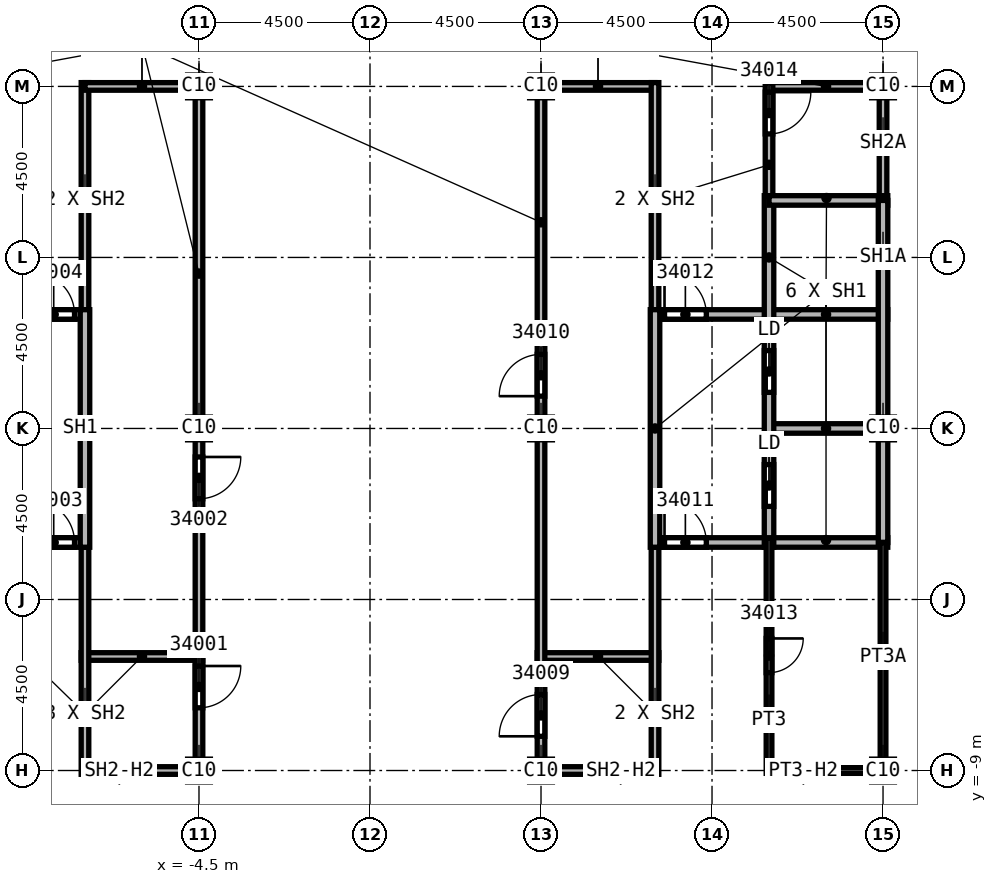
"""IFC4 building model, lengths in metres.
Left out: names, types, materials, properties, quantities, classifications, styles, units other than length and angle.
Written with IfcOpenShell. Run it as: python <this file> out.ifc"""

import sys

from ifc_helpers import new_model, si_unit, direction, frame, frame_2d, origin, origin_2d, place, context, subcontext, project, spatial, rectangle, extrude, element, fill, save


model = new_model("IFC4")
c1 = context("Model", 3, precision=1e-05, world=origin(), true_north=direction((0.0, 1.0)))
c2 = subcontext(c1, "Body", "Model", "MODEL_VIEW")
j1 = project(units=[si_unit("LENGTHUNIT", "METRE"), si_unit("PLANEANGLEUNIT", "RADIAN")], contexts=[c1])
p1 = place(None, origin())
s1 = spatial("IfcSite", under=j1, at=p1, CompositionType="ELEMENT")
p2 = place(p1, origin())
s2 = spatial("IfcBuilding", under=s1, at=p2, CompositionType="ELEMENT")
p3 = place(p2, frame((0.0, 0.0, 366.0)))
s3 = spatial("IfcBuildingStorey", under=s2, at=p3, CompositionType="ELEMENT", Elevation=366.0)
for number, where, z_axis, x_axis in (
    (1, (4.5, 0.0, 0.0), (0.0, 0.0, 1.0), (1.0, 0.0, 0.0)),
    (2, (4.5, 9.0, 0.0), (0.0, 0.0, 1.0), (1.0, 0.0, 0.0)),
    (3, (4.5, -9.0, 0.0), (0.0, 0.0, 1.0), (1.0, 0.0, 0.0)),
    (4, (13.5, 0.0, 0.0), (0.0, 0.0, 1.0), (1.0, 0.0, 0.0)),
    (5, (13.5, 9.0, 0.0), (0.0, 0.0, 1.0), (1.0, 0.0, 0.0)),
    (6, (13.5, -9.0, 0.0), (0.0, 0.0, 1.0), (1.0, 0.0, 0.0)),
    (7, (-4.5, 0.0, 0.0), (0.0, 0.0, 1.0), (1.0, 0.0, 0.0)),
    (8, (-4.5, 9.0, 0.0), (0.0, 0.0, 1.0), (1.0, 0.0, 0.0)),
    (9, (-4.5, -9.0, 0.0), (0.0, 0.0, 1.0), (1.0, 0.0, 0.0)),
):
    element("IfcColumn", number, at=place(p3, frame(where, z_axis=z_axis, x_axis=x_axis)), inside=s3, PredefinedType="COLUMN", context=c2, shape_type="SweptSolid", body=[
        extrude(rectangle(XDim=0.6, YDim=0.6, at=origin_2d()), origin(), (0.0, 0.0, 1.0), 9.6),
    ])
p4 = place(p3, frame((-7.6, -6.0, 0.0), z_axis=(0.0, 0.0, 1.0), x_axis=(1.0, 0.0, 0.0)))
e10 = element("IfcWall", 10, at=p4, inside=s3, PredefinedType="SOLIDWALL", context=c2, shape_type="SweptSolid", body=[
    extrude(rectangle(XDim=3.2, YDim=0.2, at=frame_2d((1.6, 0.0))), origin(), (0.0, 0.0, 1.0), 9.15),
])
for number, where, z_axis, x_axis in (
    (11, (-7.5, -9.1, 0.0), (0.0, 0.0, 1.0), (0.0, 1.0, 0.0)),
    (12, (-7.5, 2.875, 0.0), (0.0, 0.0, 1.0), (0.0, 1.0, 0.0)),
):
    element("IfcWall", number, at=place(p3, frame(where, z_axis=z_axis, x_axis=x_axis)), inside=s3, PredefinedType="SOLIDWALL", context=c2, shape_type="SweptSolid", body=[
        extrude(rectangle(XDim=6.225, YDim=0.2, at=frame_2d((3.113, 0.0))), origin(), (0.0, 0.0, 1.0), 9.15),
    ])
p5 = place(p3, frame((-7.5, 9.0, 0.0), z_axis=(0.0, 0.0, 1.0), x_axis=(1.0, 0.0, 0.0)))
e13 = element("IfcWall", 13, at=p5, inside=s3, PredefinedType="SOLIDWALL", context=c2, shape_type="SweptSolid", body=[
    extrude(rectangle(XDim=3.0, YDim=0.2, at=frame_2d((1.5, 0.0))), origin(), (0.0, 0.0, 1.0), 8.838),
])
p6 = place(p3, frame((-4.5, -9.0, 0.0), z_axis=(0.0, 0.0, 1.0), x_axis=(-1.0, 0.0, 0.0)))
e14 = element("IfcWall", 14, at=p6, inside=s3, PredefinedType="SOLIDWALL", context=c2, shape_type="SweptSolid", body=[
    extrude(rectangle(XDim=3.0, YDim=0.2, at=frame_2d((1.5, 0.0))), origin(), (0.0, 0.0, 1.0), 8.754),
])
p7 = place(p3, frame((-4.5, 9.1, 0.0), z_axis=(0.0, 0.0, 1.0), x_axis=(0.0, -1.0, 0.0)))
e15 = element("IfcWall", 15, at=p7, inside=s3, PredefinedType="SOLIDWALL", context=c2, shape_type="SweptSolid", body=[
    extrude(rectangle(XDim=18.2, YDim=0.2, at=frame_2d((9.1, 0.0))), origin(), (0.0, 0.0, 1.0), 8.838),
])
p8 = place(p7, frame((15.35, 0.0, 0.0)))
e16 = element("IfcOpeningElement", 16, at=p8, cuts=e15, PredefinedType="OPENING", context=c2, shape_type="SweptSolid", body=[
    extrude(rectangle(XDim=1.1, YDim=2.1, at=frame_2d((0.55, 1.05))), frame((0.0, 0.1, 0.0), z_axis=(0.0, -1.0, 0.0), x_axis=(1.0, 0.0, 0.0)), (0.0, 0.0, 1.0), 0.2),
])
p9 = place(p7, frame((9.85, 0.0, 0.0)))
e17 = element("IfcOpeningElement", 17, at=p9, cuts=e15, PredefinedType="OPENING", context=c2, shape_type="SweptSolid", body=[
    extrude(rectangle(XDim=1.1, YDim=2.1, at=frame_2d((0.55, 1.05))), frame((0.0, 0.1, 0.0), z_axis=(0.0, -1.0, 0.0), x_axis=(1.0, 0.0, 0.0)), (0.0, 0.0, 1.0), 0.2),
])
p10 = place(p3, frame((4.4, -6.0, 0.0), z_axis=(0.0, 0.0, 1.0), x_axis=(1.0, 0.0, 0.0)))
e18 = element("IfcWall", 18, at=p10, inside=s3, PredefinedType="SOLIDWALL", context=c2, shape_type="SweptSolid", body=[
    extrude(rectangle(XDim=3.2, YDim=0.2, at=frame_2d((1.6, 0.0))), origin(), (0.0, 0.0, 1.0), 9.15),
])
p11 = place(p3, frame((4.5, -9.1, 0.0), z_axis=(0.0, 0.0, 1.0), x_axis=(0.0, 1.0, 0.0)))
e19 = element("IfcWall", 19, at=p11, inside=s3, PredefinedType="SOLIDWALL", context=c2, shape_type="SweptSolid", body=[
    extrude(rectangle(XDim=18.2, YDim=0.2, at=frame_2d((9.1, 0.0))), origin(), (0.0, 0.0, 1.0), 8.838),
])
p12 = place(p11, frame((1.0, 0.0, 0.0)))
e20 = element("IfcOpeningElement", 20, at=p12, cuts=e19, PredefinedType="OPENING", context=c2, shape_type="SweptSolid", body=[
    extrude(rectangle(XDim=1.1, YDim=2.1, at=frame_2d((0.55, 1.05))), frame((0.0, 0.1, 0.0), z_axis=(0.0, -1.0, 0.0), x_axis=(1.0, 0.0, 0.0)), (0.0, 0.0, 1.0), 0.2),
])
p13 = place(p11, frame((9.95, 0.0, 0.0)))
e21 = element("IfcOpeningElement", 21, at=p13, cuts=e19, PredefinedType="OPENING", context=c2, shape_type="SweptSolid", body=[
    extrude(rectangle(XDim=1.1, YDim=2.1, at=frame_2d((0.55, 1.05))), frame((0.0, 0.1, 0.0), z_axis=(0.0, -1.0, 0.0), x_axis=(1.0, 0.0, 0.0)), (0.0, 0.0, 1.0), 0.2),
])
p14 = place(p3, frame((4.5, 9.0, 0.0), z_axis=(0.0, 0.0, 1.0), x_axis=(1.0, 0.0, 0.0)))
e22 = element("IfcWall", 22, at=p14, inside=s3, PredefinedType="SOLIDWALL", context=c2, shape_type="SweptSolid", body=[
    extrude(rectangle(XDim=3.0, YDim=0.2, at=frame_2d((1.5, 0.0))), origin(), (0.0, 0.0, 1.0), 8.838),
])
p15 = place(p3, frame((7.5, -9.0, 0.0), z_axis=(0.0, 0.0, 1.0), x_axis=(-1.0, 0.0, 0.0)))
e23 = element("IfcWall", 23, at=p15, inside=s3, PredefinedType="SOLIDWALL", context=c2, shape_type="SweptSolid", body=[
    extrude(rectangle(XDim=3.0, YDim=0.2, at=frame_2d((1.5, 0.0))), origin(), (0.0, 0.0, 1.0), 8.754),
])
for number, where, z_axis, x_axis in (
    (24, (7.5, -2.875, 0.0), (0.0, 0.0, 1.0), (0.0, -1.0, 0.0)),
    (25, (7.5, 9.1, 0.0), (0.0, 0.0, 1.0), (0.0, -1.0, 0.0)),
):
    element("IfcWall", number, at=place(p3, frame(where, z_axis=z_axis, x_axis=x_axis)), inside=s3, PredefinedType="SOLIDWALL", context=c2, shape_type="SweptSolid", body=[
        extrude(rectangle(XDim=6.225, YDim=0.2, at=frame_2d((3.113, 0.0))), origin(), (0.0, 0.0, 1.0), 9.15),
    ])
p16 = place(p3, frame((10.5, 9.0, 0.0), z_axis=(0.0, 0.0, 1.0), x_axis=(1.0, 0.0, 0.0)))
e26 = element("IfcWall", 26, at=p16, inside=s3, PredefinedType="SOLIDWALL", context=c2, shape_type="SweptSolid", body=[
    extrude(rectangle(XDim=3.0, YDim=0.2, at=frame_2d((1.5, 0.0))), origin(), (0.0, 0.0, 1.0), 8.838),
])
p17 = place(p3, frame((10.5, 9.1, 0.0), z_axis=(0.0, 0.0, 1.0), x_axis=(0.0, -1.0, 0.0)))
e27 = element("IfcWall", 27, at=p17, inside=s3, PredefinedType="SOLIDWALL", context=c2, shape_type="SweptSolid", body=[
    extrude(rectangle(XDim=3.225, YDim=0.2, at=frame_2d((1.613, 0.0))), origin(), (0.0, 0.0, 1.0), 9.15),
])
p18 = place(p17, frame((0.25, 0.0, 0.0)))
e28 = element("IfcOpeningElement", 28, at=p18, cuts=e27, PredefinedType="OPENING", context=c2, shape_type="SweptSolid", body=[
    extrude(rectangle(XDim=1.1, YDim=2.1, at=frame_2d((0.55, 1.05))), frame((0.0, 0.1, 0.0), z_axis=(0.0, -1.0, 0.0), x_axis=(1.0, 0.0, 0.0)), (0.0, 0.0, 1.0), 0.2),
])
p19 = place(p3, frame((13.5, 9.1, 0.0), z_axis=(0.0, 0.0, 1.0), x_axis=(0.0, -1.0, 0.0)))
e29 = element("IfcWall", 29, at=p19, inside=s3, PredefinedType="SOLIDWALL", context=c2, shape_type="SweptSolid", body=[
    extrude(rectangle(XDim=3.1, YDim=0.2, at=frame_2d((1.55, 0.0))), origin(), (0.0, 0.0, 1.0), 5.76),
])
p20 = place(p3, frame((-13.625, 3.0, 0.0), z_axis=(0.0, 0.0, 1.0), x_axis=(1.0, 0.0, 0.0)))
e30 = element("IfcWall", 30, at=p20, inside=s3, PredefinedType="SOLIDWALL", context=c2, shape_type="SweptSolid", body=[
    extrude(rectangle(XDim=6.125, YDim=0.25, at=frame_2d((3.062, 0.0))), origin(), (0.0, 0.0, 1.0), 9.15),
])
p21 = place(p20, frame((4.75, 0.0, 0.0)))
e31 = element("IfcOpeningElement", 31, at=p21, cuts=e30, PredefinedType="OPENING", context=c2, shape_type="SweptSolid", body=[
    extrude(rectangle(XDim=1.1, YDim=2.1, at=frame_2d((0.55, 1.05))), frame((0.0, 0.125, 0.0), z_axis=(0.0, -1.0, 0.0), x_axis=(1.0, 0.0, 0.0)), (0.0, 0.0, 1.0), 0.25),
])
p22 = place(p3, frame((-13.625, -3.0, 0.0), z_axis=(0.0, 0.0, 1.0), x_axis=(1.0, 0.0, 0.0)))
e32 = element("IfcWall", 32, at=p22, inside=s3, PredefinedType="SOLIDWALL", context=c2, shape_type="SweptSolid", body=[
    extrude(rectangle(XDim=6.125, YDim=0.25, at=frame_2d((3.062, 0.0))), origin(), (0.0, 0.0, 1.0), 9.15),
])
p23 = place(p22, frame((4.75, 0.0, 0.0)))
e33 = element("IfcOpeningElement", 33, at=p23, cuts=e32, PredefinedType="OPENING", context=c2, shape_type="SweptSolid", body=[
    extrude(rectangle(XDim=1.1, YDim=2.1, at=frame_2d((0.55, 1.05))), frame((0.0, 0.125, 0.0), z_axis=(0.0, -1.0, 0.0), x_axis=(1.0, 0.0, 0.0)), (0.0, 0.0, 1.0), 0.25),
])
p24 = place(p3, frame((-7.5, -3.125, 0.0), z_axis=(0.0, 0.0, 1.0), x_axis=(0.0, 1.0, 0.0)))
e34 = element("IfcWall", 34, at=p24, inside=s3, PredefinedType="SOLIDWALL", context=c2, shape_type="SweptSolid", body=[
    extrude(rectangle(XDim=6.25, YDim=0.25, at=frame_2d((3.125, 0.0))), origin(), (0.0, 0.0, 1.0), 9.15),
])
p25 = place(p3, frame((7.5, -3.0, 0.0), z_axis=(0.0, 0.0, 1.0), x_axis=(1.0, 0.0, 0.0)))
e35 = element("IfcWall", 35, at=p25, inside=s3, PredefinedType="SOLIDWALL", context=c2, shape_type="SweptSolid", body=[
    extrude(rectangle(XDim=6.125, YDim=0.25, at=frame_2d((3.062, 0.0))), origin(), (0.0, 0.0, 1.0), 9.15),
])
p26 = place(p25, frame((0.25, 0.0, 0.0)))
e36 = element("IfcOpeningElement", 36, at=p26, cuts=e35, PredefinedType="OPENING", context=c2, shape_type="SweptSolid", body=[
    extrude(rectangle(XDim=1.1, YDim=2.1, at=frame_2d((0.55, 1.05))), frame((0.0, 0.125, 0.0), z_axis=(0.0, -1.0, 0.0), x_axis=(1.0, 0.0, 0.0)), (0.0, 0.0, 1.0), 0.25),
])
p27 = place(p3, frame((7.5, 3.0, 0.0), z_axis=(0.0, 0.0, 1.0), x_axis=(1.0, 0.0, 0.0)))
e37 = element("IfcWall", 37, at=p27, inside=s3, PredefinedType="SOLIDWALL", context=c2, shape_type="SweptSolid", body=[
    extrude(rectangle(XDim=6.125, YDim=0.25, at=frame_2d((3.062, 0.0))), origin(), (0.0, 0.0, 1.0), 9.15),
])
p28 = place(p27, frame((0.25, 0.0, 0.0)))
e38 = element("IfcOpeningElement", 38, at=p28, cuts=e37, PredefinedType="OPENING", context=c2, shape_type="SweptSolid", body=[
    extrude(rectangle(XDim=1.1, YDim=2.1, at=frame_2d((0.55, 1.05))), frame((0.0, 0.125, 0.0), z_axis=(0.0, -1.0, 0.0), x_axis=(1.0, 0.0, 0.0)), (0.0, 0.0, 1.0), 0.25),
])
p29 = place(p3, frame((7.5, 3.125, 0.0), z_axis=(0.0, 0.0, 1.0), x_axis=(0.0, -1.0, 0.0)))
e39 = element("IfcWall", 39, at=p29, inside=s3, PredefinedType="SOLIDWALL", context=c2, shape_type="SweptSolid", body=[
    extrude(rectangle(XDim=6.25, YDim=0.25, at=frame_2d((3.125, 0.0))), origin(), (0.0, 0.0, 1.0), 9.15),
])
p30 = place(p3, frame((10.5, 0.0, 0.0), z_axis=(0.0, 0.0, 1.0), x_axis=(1.0, 0.0, 0.0)))
e40 = element("IfcWall", 40, at=p30, inside=s3, PredefinedType="SOLIDWALL", context=c2, shape_type="SweptSolid", body=[
    extrude(rectangle(XDim=3.125, YDim=0.25, at=frame_2d((1.562, 0.0))), origin(), (0.0, 0.0, 1.0), 9.15),
])
p31 = place(p3, frame((10.5, 6.125, 0.0), z_axis=(0.0, 0.0, 1.0), x_axis=(0.0, -1.0, 0.0)))
e41 = element("IfcWall", 41, at=p31, inside=s3, PredefinedType="SOLIDWALL", context=c2, shape_type="SweptSolid", body=[
    extrude(rectangle(XDim=9.25, YDim=0.25, at=frame_2d((4.625, 0.0))), origin(), (0.0, 0.0, 1.0), 9.15),
])
p32 = place(p31, frame((7.075, 0.0, 0.0)))
e42 = element("IfcOpeningElement", 42, at=p32, cuts=e41, PredefinedType="OPENING", context=c2, shape_type="SweptSolid", body=[
    extrude(rectangle(XDim=1.1, YDim=2.1, at=frame_2d((0.55, 1.05))), frame((0.0, 0.125, 0.0), z_axis=(0.0, -1.0, 0.0), x_axis=(1.0, 0.0, 0.0)), (0.0, 0.0, 1.0), 0.25),
])
p33 = place(p31, frame((4.075, 0.0, 0.0)))
e43 = element("IfcOpeningElement", 43, at=p33, cuts=e41, PredefinedType="OPENING", context=c2, shape_type="SweptSolid", body=[
    extrude(rectangle(XDim=1.1, YDim=2.1, at=frame_2d((0.55, 1.05))), frame((0.0, 0.125, 0.0), z_axis=(0.0, -1.0, 0.0), x_axis=(1.0, 0.0, 0.0)), (0.0, 0.0, 1.0), 0.25),
])
p34 = place(p3, frame((10.5, 6.0, 0.0), z_axis=(0.0, 0.0, 1.0), x_axis=(1.0, 0.0, 0.0)))
e44 = element("IfcWall", 44, at=p34, inside=s3, PredefinedType="SOLIDWALL", context=c2, shape_type="SweptSolid", body=[
    extrude(rectangle(XDim=3.125, YDim=0.25, at=frame_2d((1.562, 0.0))), origin(), (0.0, 0.0, 1.0), 9.15),
])
p35 = place(p3, frame((13.5, 6.0, 0.0), z_axis=(0.0, 0.0, 1.0), x_axis=(0.0, -1.0, 0.0)))
e45 = element("IfcWall", 45, at=p35, inside=s3, PredefinedType="SOLIDWALL", context=c2, shape_type="SweptSolid", body=[
    extrude(rectangle(XDim=9.0, YDim=0.25, at=frame_2d((4.5, 0.0))), origin(), (0.0, 0.0, 1.0), 5.76),
])
p36 = place(p3, frame((10.5, -2.875, 0.0), z_axis=(0.0, 0.0, 1.0), x_axis=(0.0, -1.0, 0.0)))
e46 = element("IfcWall", 46, at=p36, inside=s3, PredefinedType="PARTITIONING", context=c2, shape_type="SweptSolid", body=[
    extrude(rectangle(XDim=6.2, YDim=0.15, at=frame_2d((3.1, 0.0))), origin(), (0.0, 0.0, 1.0), 9.15),
])
p37 = place(p36, frame((2.65, 0.0, 0.0)))
e47 = element("IfcOpeningElement", 47, at=p37, cuts=e46, PredefinedType="OPENING", context=c2, shape_type="SweptSolid", body=[
    extrude(rectangle(XDim=0.9, YDim=2.1, at=frame_2d((0.45, 1.05))), frame((0.0, 0.075, 0.0), z_axis=(0.0, -1.0, 0.0), x_axis=(1.0, 0.0, 0.0)), (0.0, 0.0, 1.0), 0.15),
])
p38 = place(p3, frame((13.5, -9.0, 0.0), z_axis=(0.0, 0.0, 1.0), x_axis=(-1.0, 0.0, 0.0)))
e48 = element("IfcWall", 48, at=p38, inside=s3, PredefinedType="PARTITIONING", context=c2, shape_type="SweptSolid", body=[
    extrude(rectangle(XDim=3.0, YDim=0.15, at=frame_2d((1.5, 0.0))), origin(), (0.0, 0.0, 1.0), 8.754),
])
p39 = place(p3, frame((13.5, -3.0, 0.0), z_axis=(0.0, 0.0, 1.0), x_axis=(0.0, -1.0, 0.0)))
e49 = element("IfcWall", 49, at=p39, inside=s3, PredefinedType="PARTITIONING", context=c2, shape_type="SweptSolid", body=[
    extrude(rectangle(XDim=6.075, YDim=0.15, at=frame_2d((3.038, 0.0))), origin(), (0.0, 0.0, 1.0), 5.76),
])
p40 = place(p8, origin())
e50 = element("IfcDoor", 50, at=p40, inside=s3, OperationType="SINGLE_SWING_RIGHT", PredefinedType="DOOR", context=c2, shape_type="SweptSolid", body=[
    extrude(rectangle(XDim=1.1, YDim=2.1, at=frame_2d((0.55, 1.05))), frame((0.0, 0.025, 0.0), z_axis=(0.0, -1.0, 0.0), x_axis=(1.0, 0.0, 0.0)), (0.0, 0.0, 1.0), 0.05),
])
fill(e16, e50)
p41 = place(p9, origin())
e51 = element("IfcDoor", 51, at=p41, inside=s3, OperationType="SINGLE_SWING_LEFT", PredefinedType="DOOR", context=c2, shape_type="SweptSolid", body=[
    extrude(rectangle(XDim=1.1, YDim=2.1, at=frame_2d((0.55, 1.05))), frame((0.0, 0.025, 0.0), z_axis=(0.0, -1.0, 0.0), x_axis=(1.0, 0.0, 0.0)), (0.0, 0.0, 1.0), 0.05),
])
fill(e17, e51)
p42 = place(p23, origin())
e52 = element("IfcDoor", 52, at=p42, inside=s3, OperationType="SINGLE_SWING_RIGHT", PredefinedType="DOOR", context=c2, shape_type="SweptSolid", body=[
    extrude(rectangle(XDim=1.1, YDim=2.1, at=frame_2d((0.55, 1.05))), frame((0.0, 0.025, 0.0), z_axis=(0.0, -1.0, 0.0), x_axis=(1.0, 0.0, 0.0)), (0.0, 0.0, 1.0), 0.05),
])
fill(e33, e52)
p43 = place(p21, origin())
e53 = element("IfcDoor", 53, at=p43, inside=s3, OperationType="SINGLE_SWING_LEFT", PredefinedType="DOOR", context=c2, shape_type="SweptSolid", body=[
    extrude(rectangle(XDim=1.1, YDim=2.1, at=frame_2d((0.55, 1.05))), frame((0.0, 0.025, 0.0), z_axis=(0.0, -1.0, 0.0), x_axis=(1.0, 0.0, 0.0)), (0.0, 0.0, 1.0), 0.05),
])
fill(e31, e53)
p44 = place(p12, origin())
e54 = element("IfcDoor", 54, at=p44, inside=s3, OperationType="SINGLE_SWING_RIGHT", PredefinedType="DOOR", context=c2, shape_type="SweptSolid", body=[
    extrude(rectangle(XDim=1.1, YDim=2.1, at=frame_2d((0.55, 1.05))), frame((0.0, 0.025, 0.0), z_axis=(0.0, -1.0, 0.0), x_axis=(1.0, 0.0, 0.0)), (0.0, 0.0, 1.0), 0.05),
])
fill(e20, e54)
p45 = place(p13, origin())
e55 = element("IfcDoor", 55, at=p45, inside=s3, OperationType="SINGLE_SWING_LEFT", PredefinedType="DOOR", context=c2, shape_type="SweptSolid", body=[
    extrude(rectangle(XDim=1.1, YDim=2.1, at=frame_2d((0.55, 1.05))), frame((0.0, 0.025, 0.0), z_axis=(0.0, -1.0, 0.0), x_axis=(1.0, 0.0, 0.0)), (0.0, 0.0, 1.0), 0.05),
])
fill(e21, e55)
p46 = place(p26, origin())
e56 = element("IfcDoor", 56, at=p46, inside=s3, OperationType="SINGLE_SWING_RIGHT", PredefinedType="DOOR", context=c2, shape_type="SweptSolid", body=[
    extrude(rectangle(XDim=1.1, YDim=2.1, at=frame_2d((0.55, 1.05))), frame((0.0, 0.025, 0.0), z_axis=(0.0, -1.0, 0.0), x_axis=(1.0, 0.0, 0.0)), (0.0, 0.0, 1.0), 0.05),
])
fill(e36, e56)
p47 = place(p28, origin())
e57 = element("IfcDoor", 57, at=p47, inside=s3, OperationType="SINGLE_SWING_LEFT", PredefinedType="DOOR", context=c2, shape_type="SweptSolid", body=[
    extrude(rectangle(XDim=1.1, YDim=2.1, at=frame_2d((0.55, 1.05))), frame((0.0, 0.025, 0.0), z_axis=(0.0, -1.0, 0.0), x_axis=(1.0, 0.0, 0.0)), (0.0, 0.0, 1.0), 0.05),
])
fill(e38, e57)
p48 = place(p37, origin())
e58 = element("IfcDoor", 58, at=p48, inside=s3, OperationType="SINGLE_SWING_RIGHT", PredefinedType="DOOR", context=c2, shape_type="SweptSolid", body=[
    extrude(rectangle(XDim=0.9, YDim=2.1, at=frame_2d((0.45, 1.05))), frame((0.0, 0.025, 0.0), z_axis=(0.0, -1.0, 0.0), x_axis=(1.0, 0.0, 0.0)), (0.0, 0.0, 1.0), 0.05),
])
fill(e47, e58)
p49 = place(p18, origin())
e59 = element("IfcDoor", 59, at=p49, inside=s3, OperationType="SINGLE_SWING_LEFT", PredefinedType="DOOR", context=c2, shape_type="SweptSolid", body=[
    extrude(rectangle(XDim=1.1, YDim=2.1, at=frame_2d((0.55, 1.05))), frame((0.0, 0.025, 0.0), z_axis=(0.0, -1.0, 0.0), x_axis=(1.0, 0.0, 0.0)), (0.0, 0.0, 1.0), 0.05),
])
fill(e28, e59)
p50 = place(p32, origin())
e60 = element("IfcDoor", 60, at=p50, inside=s3, OperationType="SLIDING_TO_LEFT", PredefinedType="DOOR", context=c2, shape_type="SweptSolid", body=[
    extrude(rectangle(XDim=1.1, YDim=2.1, at=frame_2d((0.55, 1.05))), frame((0.0, 0.025, 0.0), z_axis=(0.0, -1.0, 0.0), x_axis=(1.0, 0.0, 0.0)), (0.0, 0.0, 1.0), 0.05),
])
fill(e42, e60)
p51 = place(p33, origin())
e61 = element("IfcDoor", 61, at=p51, inside=s3, OperationType="SLIDING_TO_LEFT", PredefinedType="DOOR", context=c2, shape_type="SweptSolid", body=[
    extrude(rectangle(XDim=1.1, YDim=2.1, at=frame_2d((0.55, 1.05))), frame((0.0, 0.025, 0.0), z_axis=(0.0, -1.0, 0.0), x_axis=(1.0, 0.0, 0.0)), (0.0, 0.0, 1.0), 0.05),
])
fill(e43, e61)
save(model, sys.argv[1])
